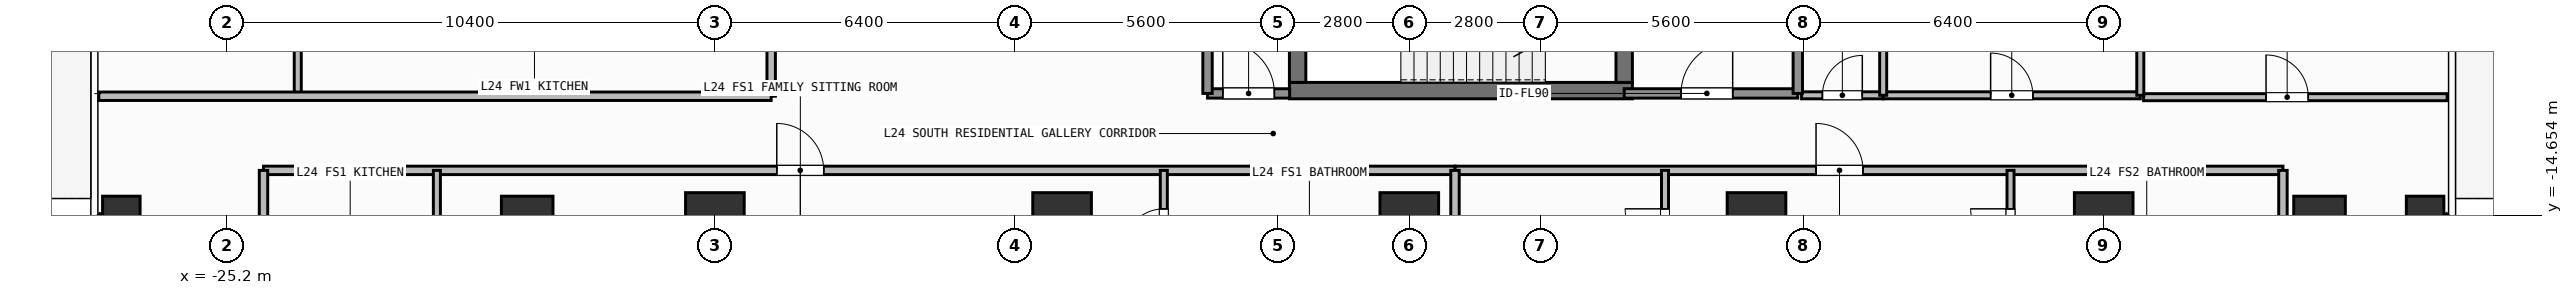
"""IFC4 building model, lengths in metres.
Left out: names, types, materials, properties, quantities, classifications, styles, units other than length and angle.
Written with IfcOpenShell. Run it as: python <this file> out.ifc"""

import sys

from ifc_helpers import new_model, si_unit, direction, frame, frame_2d, origin, origin_2d, place, context, subcontext, project, spatial, rectangle, hollow_rectangle, extrude, element, fill, save


model = new_model("IFC4")
c1 = context("Model", 3, precision=1e-05, world=origin(), true_north=direction((0.0, 1.0)))
c2 = subcontext(c1, "Body", "Model", "MODEL_VIEW")
j1 = project(units=[si_unit("LENGTHUNIT", "METRE"), si_unit("PLANEANGLEUNIT", "RADIAN")], contexts=[c1])
p1 = place(None, origin())
s1 = spatial("IfcSite", under=j1, at=p1, CompositionType="ELEMENT")
p2 = place(p1, origin())
s2 = spatial("IfcBuilding", under=s1, at=p2, CompositionType="ELEMENT")
p3 = place(p2, frame((0.0, 0.0, 96.9)))
s3 = spatial("IfcBuildingStorey", under=s2, at=p3, CompositionType="ELEMENT", Elevation=96.9)
p4 = place(p3, frame((-2.555, -12.0, 0.0), z_axis=(0.0, 0.0, 1.0), x_axis=(1.0, 0.0, 0.0)))
e1 = element("IfcWall", 1, at=p4, inside=s3, PredefinedType="SHEAR", context=c2, shape_type="SweptSolid", body=[
    extrude(rectangle(XDim=7.31, YDim=0.35, at=frame_2d((3.655, 0.0))), origin(), (0.0, 0.0, 1.0), 3.9),
])
p5 = place(p3, frame((-2.38, -11.825, 0.0), z_axis=(0.0, 0.0, 1.0), x_axis=(0.0, 1.0, 0.0)))
e2 = element("IfcWall", 2, at=p5, inside=s3, PredefinedType="SHEAR", context=c2, shape_type="SweptSolid", body=[
    extrude(rectangle(XDim=2.925, YDim=0.35, at=frame_2d((1.462, 0.0))), origin(), (0.0, 0.0, 1.0), 3.9),
])
p6 = place(p3, frame((4.58, -8.9, 0.0), z_axis=(0.0, 0.0, 1.0), x_axis=(0.0, -1.0, 0.0)))
e3 = element("IfcWall", 3, at=p6, inside=s3, PredefinedType="SHEAR", context=c2, shape_type="SweptSolid", body=[
    extrude(rectangle(XDim=2.925, YDim=0.35, at=frame_2d((1.462, 0.0))), origin(), (0.0, 0.0, 1.0), 3.9),
])
p7 = place(p6, frame((0.913, 0.0, 0.0)))
e4 = element("IfcOpeningElement", 4, at=p7, cuts=e3, PredefinedType="OPENING", context=c2, shape_type="SweptSolid", body=[
    extrude(rectangle(XDim=1.1, YDim=2.15, at=frame_2d((0.55, 1.075))), frame((0.0, 0.185, 0.0), z_axis=(0.0, -1.0, 0.0), x_axis=(1.0, 0.0, 0.0)), (0.0, 0.0, 1.0), 0.37),
])
for number, where, z_axis, x_axis in (
    (5, (-14.8, -14.8, 0.0), (0.0, 0.0, 1.0), (1.0, 0.0, 0.0)),
    (6, (-7.4, -14.8, 0.0), (0.0, 0.0, 1.0), (1.0, 0.0, 0.0)),
    (7, (0.0, -14.8, 0.0), (0.0, 0.0, 1.0), (1.0, 0.0, 0.0)),
    (8, (7.4, -14.8, 0.0), (0.0, 0.0, 1.0), (1.0, 0.0, 0.0)),
    (9, (14.8, -14.8, 0.0), (0.0, 0.0, 1.0), (1.0, 0.0, 0.0)),
):
    element("IfcColumn", number, at=place(p3, frame(where, z_axis=z_axis, x_axis=x_axis)), inside=s3, PredefinedType="COLUMN", context=c2, shape_type="SweptSolid", body=[
        extrude(rectangle(XDim=1.25, YDim=1.25, at=origin_2d()), origin(), (0.0, 0.0, 1.0), 3.9),
    ])
for number, where, z_axis, x_axis in (
    (10, (-18.8, -14.8, 0.0), (0.0, 0.0, 1.0), (1.0, 0.0, 0.0)),
    (11, (19.4, -14.8, 0.0), (0.0, 0.0, 1.0), (1.0, 0.0, 0.0)),
):
    element("IfcColumn", number, at=place(p3, frame(where, z_axis=z_axis, x_axis=x_axis)), inside=s3, PredefinedType="COLUMN", context=c2, shape_type="SweptSolid", body=[
        extrude(rectangle(XDim=1.1, YDim=1.1, at=origin_2d()), origin(), (0.0, 0.0, 1.0), 3.9),
    ])
for number, where, z_axis, x_axis in (
    (12, (-27.45, -14.65, 0.0), (0.0, 0.0, 1.0), (1.0, 0.0, 0.0)),
    (13, (21.65, -14.65, 0.0), (0.0, 0.0, 1.0), (1.0, 0.0, 0.0)),
):
    element("IfcColumn", number, at=place(p3, frame(where, z_axis=z_axis, x_axis=x_axis)), inside=s3, PredefinedType="COLUMN", context=c2, shape_type="SweptSolid", body=[
        extrude(hollow_rectangle(XDim=0.8, YDim=0.8, WallThickness=0.036, at=origin_2d()), origin(), (0.0, 0.0, 1.0), 3.9),
    ])
p8 = place(p3, frame((-23.408, -19.292, 0.0), z_axis=(0.0, 0.0, 1.0), x_axis=(-0.707087954376, 0.707125607496, 0.0)))
e14 = element("IfcWall", 14, at=p8, inside=s3, PredefinedType="SOLIDWALL", context=c2, shape_type="SweptSolid", body=[
    extrude(rectangle(XDim=6.484, YDim=0.24, at=frame_2d((3.242, 0.0))), origin(), (0.0, 0.0, 1.0), 3.68),
])
p9 = place(p8, frame((2.492, 0.0, 0.8)))
e15 = element("IfcOpeningElement", 15, at=p9, cuts=e14, PredefinedType="OPENING", context=c2, shape_type="SweptSolid", body=[
    extrude(rectangle(XDim=1.5, YDim=1.85, at=frame_2d((0.75, 0.925))), frame((0.0, 0.13, 0.0), z_axis=(0.0, -1.0, 0.0), x_axis=(1.0, 0.0, 0.0)), (0.0, 0.0, 1.0), 0.26),
])
p10 = place(p3, frame((22.192, -14.708, 0.0), z_axis=(0.0, 0.0, 1.0), x_axis=(-0.707087954376, -0.707125607496, 0.0)))
e16 = element("IfcWall", 16, at=p10, inside=s3, PredefinedType="SOLIDWALL", context=c2, shape_type="SweptSolid", body=[
    extrude(rectangle(XDim=6.484, YDim=0.24, at=frame_2d((3.242, 0.0))), origin(), (0.0, 0.0, 1.0), 3.68),
])
p11 = place(p3, frame((4.58, -12.06, 0.0), z_axis=(0.0, 0.0, 1.0), x_axis=(1.0, 0.0, 0.0)))
e17 = element("IfcWall", 17, at=p11, inside=s3, PredefinedType="SOLIDWALL", context=c2, shape_type="SweptSolid", body=[
    extrude(rectangle(XDim=3.7, YDim=0.2, at=frame_2d((1.85, 0.0))), origin(), (0.0, 0.0, 1.0), 3.68),
])
p12 = place(p11, frame((1.212, 0.0, 0.0)))
e18 = element("IfcOpeningElement", 18, at=p12, cuts=e17, PredefinedType="OPENING", context=c2, shape_type="SweptSolid", body=[
    extrude(rectangle(XDim=1.1, YDim=2.15, at=frame_2d((0.55, 1.075))), frame((0.0, 0.11, 0.0), z_axis=(0.0, -1.0, 0.0), x_axis=(1.0, 0.0, 0.0)), (0.0, 0.0, 1.0), 0.22),
])
p13 = place(p3, frame((-4.3, -12.06, 0.0), z_axis=(0.0, 0.0, 1.0), x_axis=(1.0, 0.0, 0.0)))
e19 = element("IfcWall", 19, at=p13, inside=s3, PredefinedType="SOLIDWALL", context=c2, shape_type="SweptSolid", body=[
    extrude(rectangle(XDim=1.75, YDim=0.2, at=frame_2d((0.875, 0.0))), origin(), (0.0, 0.0, 1.0), 3.68),
])
p14 = place(p13, frame((0.325, 0.0, 0.0)))
e20 = element("IfcOpeningElement", 20, at=p14, cuts=e19, PredefinedType="OPENING", context=c2, shape_type="SweptSolid", body=[
    extrude(rectangle(XDim=1.1, YDim=2.15, at=frame_2d((0.55, 1.075))), frame((0.0, 0.11, 0.0), z_axis=(0.0, -1.0, 0.0), x_axis=(1.0, 0.0, 0.0)), (0.0, 0.0, 1.0), 0.22),
])
p15 = place(p3, frame((8.36, -12.1, 0.0), z_axis=(0.0, 0.0, 1.0), x_axis=(1.0, 0.0, 0.0)))
e21 = element("IfcWall", 21, at=p15, inside=s3, PredefinedType="PARTITIONING", context=c2, shape_type="SweptSolid", body=[
    extrude(rectangle(XDim=1.74, YDim=0.15, at=frame_2d((0.87, 0.0))), origin(), (0.0, 0.0, 1.0), 3.68),
])
p16 = place(p15, frame((0.445, 0.0, 0.0)))
e22 = element("IfcOpeningElement", 22, at=p16, cuts=e21, PredefinedType="OPENING", context=c2, shape_type="SweptSolid", body=[
    extrude(rectangle(XDim=0.85, YDim=2.1, at=frame_2d((0.425, 1.05))), frame((0.0, 0.085, 0.0), z_axis=(0.0, -1.0, 0.0), x_axis=(1.0, 0.0, 0.0)), (0.0, 0.0, 1.0), 0.17),
])
p17 = place(p3, frame((10.1, -12.1, 0.0), z_axis=(0.0, 0.0, 1.0), x_axis=(1.0, 0.0, 0.0)))
e23 = element("IfcWall", 23, at=p17, inside=s3, PredefinedType="PARTITIONING", context=c2, shape_type="SweptSolid", body=[
    extrude(rectangle(XDim=5.48, YDim=0.15, at=frame_2d((2.74, 0.0))), origin(), (0.0, 0.0, 1.0), 3.68),
])
p18 = place(p17, frame((2.29, 0.0, 0.0)))
e24 = element("IfcOpeningElement", 24, at=p18, cuts=e23, PredefinedType="OPENING", context=c2, shape_type="SweptSolid", body=[
    extrude(rectangle(XDim=0.9, YDim=2.1, at=frame_2d((0.45, 1.05))), frame((0.0, 0.085, 0.0), z_axis=(0.0, -1.0, 0.0), x_axis=(1.0, 0.0, 0.0)), (0.0, 0.0, 1.0), 0.17),
])
p19 = place(p3, frame((-24.42, -13.7, 0.0), z_axis=(0.0, 0.0, 1.0), x_axis=(1.0, 0.0, 0.0)))
e25 = element("IfcWall", 25, at=p19, inside=s3, PredefinedType="PARTITIONING", context=c2, shape_type="SweptSolid", body=[
    extrude(rectangle(XDim=25.394, YDim=0.18, at=frame_2d((12.697, 0.0))), origin(), (0.0, 0.0, 1.0), 3.68),
])
p20 = place(p19, frame((10.939, 0.0, 0.0)))
e26 = element("IfcOpeningElement", 26, at=p20, cuts=e25, PredefinedType="OPENING", context=c2, shape_type="SweptSolid", body=[
    extrude(rectangle(XDim=1.0, YDim=2.2, at=frame_2d((0.5, 1.1))), frame((0.0, 0.1, 0.0), z_axis=(0.0, -1.0, 0.0), x_axis=(1.0, 0.0, 0.0)), (0.0, 0.0, 1.0), 0.2),
])
p21 = place(p3, frame((-20.725, -16.19, 0.0), z_axis=(0.0, 0.0, 1.0), x_axis=(0.0, 1.0, 0.0)))
e27 = element("IfcWall", 27, at=p21, inside=s3, PredefinedType="PARTITIONING", context=c2, shape_type="SweptSolid", body=[
    extrude(rectangle(XDim=2.49, YDim=0.15, at=frame_2d((1.245, 0.0))), origin(), (0.0, 0.0, 1.0), 3.68),
])
p22 = place(p21, frame((0.325, 0.0, 0.0)))
e28 = element("IfcOpeningElement", 28, at=p22, cuts=e27, PredefinedType="OPENING", context=c2, shape_type="SweptSolid", body=[
    extrude(rectangle(XDim=0.85, YDim=2.1, at=frame_2d((0.425, 1.05))), frame((0.0, 0.085, 0.0), z_axis=(0.0, -1.0, 0.0), x_axis=(1.0, 0.0, 0.0)), (0.0, 0.0, 1.0), 0.17),
])
p23 = place(p3, frame((-5.232, -16.19, 0.0), z_axis=(0.0, 0.0, 1.0), x_axis=(0.0, 1.0, 0.0)))
e29 = element("IfcWall", 29, at=p23, inside=s3, PredefinedType="PARTITIONING", context=c2, shape_type="SweptSolid", body=[
    extrude(rectangle(XDim=2.49, YDim=0.15, at=frame_2d((1.245, 0.0))), origin(), (0.0, 0.0, 1.0), 3.68),
])
p24 = place(p23, frame((0.82, 0.0, 0.0)))
e30 = element("IfcOpeningElement", 30, at=p24, cuts=e29, PredefinedType="OPENING", context=c2, shape_type="SweptSolid", body=[
    extrude(rectangle(XDim=0.85, YDim=2.1, at=frame_2d((0.425, 1.05))), frame((0.0, 0.085, 0.0), z_axis=(0.0, -1.0, 0.0), x_axis=(1.0, 0.0, 0.0)), (0.0, 0.0, 1.0), 0.17),
])
p25 = place(p3, frame((0.974, -13.7, 0.0), z_axis=(0.0, 0.0, 1.0), x_axis=(1.0, 0.0, 0.0)))
e31 = element("IfcWall", 31, at=p25, inside=s3, PredefinedType="PARTITIONING", context=c2, shape_type="SweptSolid", body=[
    extrude(rectangle(XDim=17.646, YDim=0.18, at=frame_2d((8.823, 0.0))), origin(), (0.0, 0.0, 1.0), 3.68),
])
p26 = place(p25, frame((7.695, 0.0, 0.0)))
e32 = element("IfcOpeningElement", 32, at=p26, cuts=e31, PredefinedType="OPENING", context=c2, shape_type="SweptSolid", body=[
    extrude(rectangle(XDim=1.0, YDim=2.2, at=frame_2d((0.5, 1.1))), frame((0.0, 0.1, 0.0), z_axis=(0.0, -1.0, 0.0), x_axis=(1.0, 0.0, 0.0)), (0.0, 0.0, 1.0), 0.2),
])
p27 = place(p3, frame((5.45, -16.19, 0.0), z_axis=(0.0, 0.0, 1.0), x_axis=(0.0, 1.0, 0.0)))
e33 = element("IfcWall", 33, at=p27, inside=s3, PredefinedType="PARTITIONING", context=c2, shape_type="SweptSolid", body=[
    extrude(rectangle(XDim=2.49, YDim=0.15, at=frame_2d((1.245, 0.0))), origin(), (0.0, 0.0, 1.0), 3.68),
])
p28 = place(p27, frame((0.82, 0.0, 0.0)))
e34 = element("IfcOpeningElement", 34, at=p28, cuts=e33, PredefinedType="OPENING", context=c2, shape_type="SweptSolid", body=[
    extrude(rectangle(XDim=0.85, YDim=2.1, at=frame_2d((0.425, 1.05))), frame((0.0, 0.085, 0.0), z_axis=(0.0, -1.0, 0.0), x_axis=(1.0, 0.0, 0.0)), (0.0, 0.0, 1.0), 0.17),
])
p29 = place(p3, frame((12.814, -16.19, 0.0), z_axis=(0.0, 0.0, 1.0), x_axis=(0.0, 1.0, 0.0)))
e35 = element("IfcWall", 35, at=p29, inside=s3, PredefinedType="PARTITIONING", context=c2, shape_type="SweptSolid", body=[
    extrude(rectangle(XDim=2.49, YDim=0.15, at=frame_2d((1.245, 0.0))), origin(), (0.0, 0.0, 1.0), 3.68),
])
p30 = place(p29, frame((0.82, 0.0, 0.0)))
e36 = element("IfcOpeningElement", 36, at=p30, cuts=e35, PredefinedType="OPENING", context=c2, shape_type="SweptSolid", body=[
    extrude(rectangle(XDim=0.85, YDim=2.1, at=frame_2d((0.425, 1.05))), frame((0.0, 0.085, 0.0), z_axis=(0.0, -1.0, 0.0), x_axis=(1.0, 0.0, 0.0)), (0.0, 0.0, 1.0), 0.17),
])
p31 = place(p3, frame((-13.6, -12.12, 0.0), z_axis=(0.0, 0.0, 1.0), x_axis=(0.0, 1.0, 0.0)))
e37 = element("IfcWall", 37, at=p31, inside=s3, PredefinedType="PARTITIONING", context=c2, shape_type="SweptSolid", body=[
    extrude(rectangle(XDim=10.52, YDim=0.18, at=frame_2d((5.26, 0.0))), origin(), (0.0, 0.0, 1.0), 3.68),
])
p32 = place(p31, frame((5.468, 0.0, 0.0)))
e38 = element("IfcOpeningElement", 38, at=p32, cuts=e37, PredefinedType="OPENING", context=c2, shape_type="SweptSolid", body=[
    extrude(rectangle(XDim=1.0, YDim=2.2, at=frame_2d((0.5, 1.1))), frame((0.0, 0.1, 0.0), z_axis=(0.0, -1.0, 0.0), x_axis=(1.0, 0.0, 0.0)), (0.0, 0.0, 1.0), 0.2),
])
p33 = place(p3, frame((15.65, -12.14, 0.0), z_axis=(0.0, 0.0, 1.0), x_axis=(1.0, 0.0, 0.0)))
e39 = element("IfcWall", 39, at=p33, inside=s3, PredefinedType="PARTITIONING", context=c2, shape_type="SweptSolid", body=[
    extrude(rectangle(XDim=6.47, YDim=0.15, at=frame_2d((3.235, 0.0))), origin(), (0.0, 0.0, 1.0), 3.68),
])
p34 = place(p33, frame((2.61, 0.0, 0.0)))
e40 = element("IfcOpeningElement", 40, at=p34, cuts=e39, PredefinedType="OPENING", context=c2, shape_type="SweptSolid", body=[
    extrude(rectangle(XDim=0.9, YDim=2.1, at=frame_2d((0.45, 1.05))), frame((0.0, 0.085, 0.0), z_axis=(0.0, -1.0, 0.0), x_axis=(1.0, 0.0, 0.0)), (0.0, 0.0, 1.0), 0.17),
])
for number, where, z_axis, x_axis in (
    (41, (8.28, -12.06, 0.0), (0.0, 0.0, 1.0), (0.0, 1.0, 0.0)),
    (42, (-4.3, -12.06, 0.0), (0.0, 0.0, 1.0), (0.0, 1.0, 0.0)),
):
    element("IfcWall", number, at=place(p3, frame(where, z_axis=z_axis, x_axis=x_axis)), inside=s3, PredefinedType="SOLIDWALL", context=c2, shape_type="SweptSolid", body=[
        extrude(rectangle(XDim=3.185, YDim=0.2, at=frame_2d((1.593, 0.0))), origin(), (0.0, 0.0, 1.0), 3.68),
    ])
p35 = place(p3, frame((10.1, -12.1, 0.0), z_axis=(0.0, 0.0, 1.0), x_axis=(0.0, 1.0, 0.0)))
e43 = element("IfcWall", 43, at=p35, inside=s3, PredefinedType="PARTITIONING", context=c2, shape_type="SweptSolid", body=[
    extrude(rectangle(XDim=2.35, YDim=0.15, at=frame_2d((1.175, 0.0))), origin(), (0.0, 0.0, 1.0), 3.68),
])
p36 = place(p3, frame((15.58, -12.1, 0.0), z_axis=(0.0, 0.0, 1.0), x_axis=(0.0, 1.0, 0.0)))
e44 = element("IfcWall", 44, at=p36, inside=s3, PredefinedType="PARTITIONING", context=c2, shape_type="SweptSolid", body=[
    extrude(rectangle(XDim=6.25, YDim=0.15, at=frame_2d((3.125, 0.0))), origin(), (0.0, 0.0, 1.0), 3.68),
])
for number, where, z_axis, x_axis in (
    (45, (-24.42, -18.11, 0.0), (0.0, 0.0, 1.0), (0.0, 1.0, 0.0)),
    (46, (18.62, -18.11, 0.0), (0.0, 0.0, 1.0), (0.0, 1.0, 0.0)),
):
    element("IfcWall", number, at=place(p3, frame(where, z_axis=z_axis, x_axis=x_axis)), inside=s3, PredefinedType="PARTITIONING", context=c2, shape_type="SweptSolid", body=[
        extrude(rectangle(XDim=4.41, YDim=0.18, at=frame_2d((2.205, 0.0))), origin(), (0.0, 0.0, 1.0), 3.68),
    ])
p37 = place(p3, frame((0.974, -19.23, 0.0), z_axis=(0.0, 0.0, 1.0), x_axis=(0.0, 1.0, 0.0)))
e47 = element("IfcWall", 47, at=p37, inside=s3, PredefinedType="PARTITIONING", context=c2, shape_type="SweptSolid", body=[
    extrude(rectangle(XDim=5.53, YDim=0.18, at=frame_2d((2.765, 0.0))), origin(), (0.0, 0.0, 1.0), 3.68),
])
p38 = place(p3, frame((-23.69, -12.12, 0.0), z_axis=(0.0, 0.0, 1.0), x_axis=(0.0, 1.0, 0.0)))
e48 = element("IfcWall", 48, at=p38, inside=s3, PredefinedType="PARTITIONING", context=c2, shape_type="SweptSolid", body=[
    extrude(rectangle(XDim=2.8, YDim=0.15, at=frame_2d((1.4, 0.0))), origin(), (0.0, 0.0, 1.0), 3.68),
])
p39 = place(p3, frame((-27.93, -12.12, 0.0), z_axis=(0.0, 0.0, 1.0), x_axis=(1.0, 0.0, 0.0)))
e49 = element("IfcWall", 49, at=p39, inside=s3, PredefinedType="PARTITIONING", context=c2, shape_type="SweptSolid", body=[
    extrude(rectangle(XDim=14.33, YDim=0.18, at=frame_2d((7.165, 0.0))), origin(), (0.0, 0.0, 1.0), 3.68),
])
p40 = place(p12, origin())
e50 = element("IfcDoor", 50, at=p40, inside=s3, OperationType="SINGLE_SWING_RIGHT", PredefinedType="DOOR", context=c2, shape_type="SweptSolid", body=[
    extrude(rectangle(XDim=1.1, YDim=2.15, at=frame_2d((0.55, 1.075))), frame((0.0, 0.025, 0.0), z_axis=(0.0, -1.0, 0.0), x_axis=(1.0, 0.0, 0.0)), (0.0, 0.0, 1.0), 0.05),
])
fill(e18, e50)
p41 = place(p14, origin())
e51 = element("IfcDoor", 51, at=p41, inside=s3, OperationType="SINGLE_SWING_LEFT", PredefinedType="DOOR", context=c2, shape_type="SweptSolid", body=[
    extrude(rectangle(XDim=1.1, YDim=2.15, at=frame_2d((0.55, 1.075))), frame((0.0, 0.025, 0.0), z_axis=(0.0, -1.0, 0.0), x_axis=(1.0, 0.0, 0.0)), (0.0, 0.0, 1.0), 0.05),
])
fill(e20, e51)
p42 = place(p16, origin())
e52 = element("IfcDoor", 52, at=p42, inside=s3, OperationType="SINGLE_SWING_RIGHT", PredefinedType="DOOR", context=c2, shape_type="SweptSolid", body=[
    extrude(rectangle(XDim=0.85, YDim=2.1, at=frame_2d((0.425, 1.05))), frame((0.0, 0.025, 0.0), z_axis=(0.0, -1.0, 0.0), x_axis=(1.0, 0.0, 0.0)), (0.0, 0.0, 1.0), 0.05),
])
fill(e22, e52)
p43 = place(p18, origin())
e53 = element("IfcDoor", 53, at=p43, inside=s3, OperationType="SINGLE_SWING_LEFT", PredefinedType="DOOR", context=c2, shape_type="SweptSolid", body=[
    extrude(rectangle(XDim=0.9, YDim=2.1, at=frame_2d((0.45, 1.05))), frame((0.0, 0.025, 0.0), z_axis=(0.0, -1.0, 0.0), x_axis=(1.0, 0.0, 0.0)), (0.0, 0.0, 1.0), 0.05),
])
fill(e24, e53)
p44 = place(p20, origin())
e54 = element("IfcDoor", 54, at=p44, inside=s3, OperationType="SINGLE_SWING_LEFT", PredefinedType="DOOR", context=c2, shape_type="SweptSolid", body=[
    extrude(rectangle(XDim=1.0, YDim=2.2, at=frame_2d((0.5, 1.1))), frame((0.0, 0.025, 0.0), z_axis=(0.0, -1.0, 0.0), x_axis=(1.0, 0.0, 0.0)), (0.0, 0.0, 1.0), 0.05),
])
fill(e26, e54)
p45 = place(p24, origin())
e55 = element("IfcDoor", 55, at=p45, inside=s3, OperationType="SINGLE_SWING_LEFT", PredefinedType="DOOR", context=c2, shape_type="SweptSolid", body=[
    extrude(rectangle(XDim=0.85, YDim=2.1, at=frame_2d((0.425, 1.05))), frame((0.0, 0.025, 0.0), z_axis=(0.0, -1.0, 0.0), x_axis=(1.0, 0.0, 0.0)), (0.0, 0.0, 1.0), 0.05),
])
fill(e30, e55)
p46 = place(p26, origin())
e56 = element("IfcDoor", 56, at=p46, inside=s3, OperationType="SINGLE_SWING_LEFT", PredefinedType="DOOR", context=c2, shape_type="SweptSolid", body=[
    extrude(rectangle(XDim=1.0, YDim=2.2, at=frame_2d((0.5, 1.1))), frame((0.0, 0.025, 0.0), z_axis=(0.0, -1.0, 0.0), x_axis=(1.0, 0.0, 0.0)), (0.0, 0.0, 1.0), 0.05),
])
fill(e32, e56)
p47 = place(p28, origin())
e57 = element("IfcDoor", 57, at=p47, inside=s3, OperationType="SINGLE_SWING_RIGHT", PredefinedType="DOOR", context=c2, shape_type="SweptSolid", body=[
    extrude(rectangle(XDim=0.85, YDim=2.1, at=frame_2d((0.425, 1.05))), frame((0.0, 0.025, 0.0), z_axis=(0.0, -1.0, 0.0), x_axis=(1.0, 0.0, 0.0)), (0.0, 0.0, 1.0), 0.05),
])
fill(e34, e57)
p48 = place(p30, origin())
e58 = element("IfcDoor", 58, at=p48, inside=s3, OperationType="SINGLE_SWING_RIGHT", PredefinedType="DOOR", context=c2, shape_type="SweptSolid", body=[
    extrude(rectangle(XDim=0.85, YDim=2.1, at=frame_2d((0.425, 1.05))), frame((0.0, 0.025, 0.0), z_axis=(0.0, -1.0, 0.0), x_axis=(1.0, 0.0, 0.0)), (0.0, 0.0, 1.0), 0.05),
])
fill(e36, e58)
p49 = place(p34, origin())
e59 = element("IfcDoor", 59, at=p49, inside=s3, OperationType="SINGLE_SWING_LEFT", PredefinedType="DOOR", context=c2, shape_type="SweptSolid", body=[
    extrude(rectangle(XDim=0.9, YDim=2.1, at=frame_2d((0.45, 1.05))), frame((0.0, 0.025, 0.0), z_axis=(0.0, -1.0, 0.0), x_axis=(1.0, 0.0, 0.0)), (0.0, 0.0, 1.0), 0.05),
])
fill(e40, e59)
save(model, sys.argv[1])
